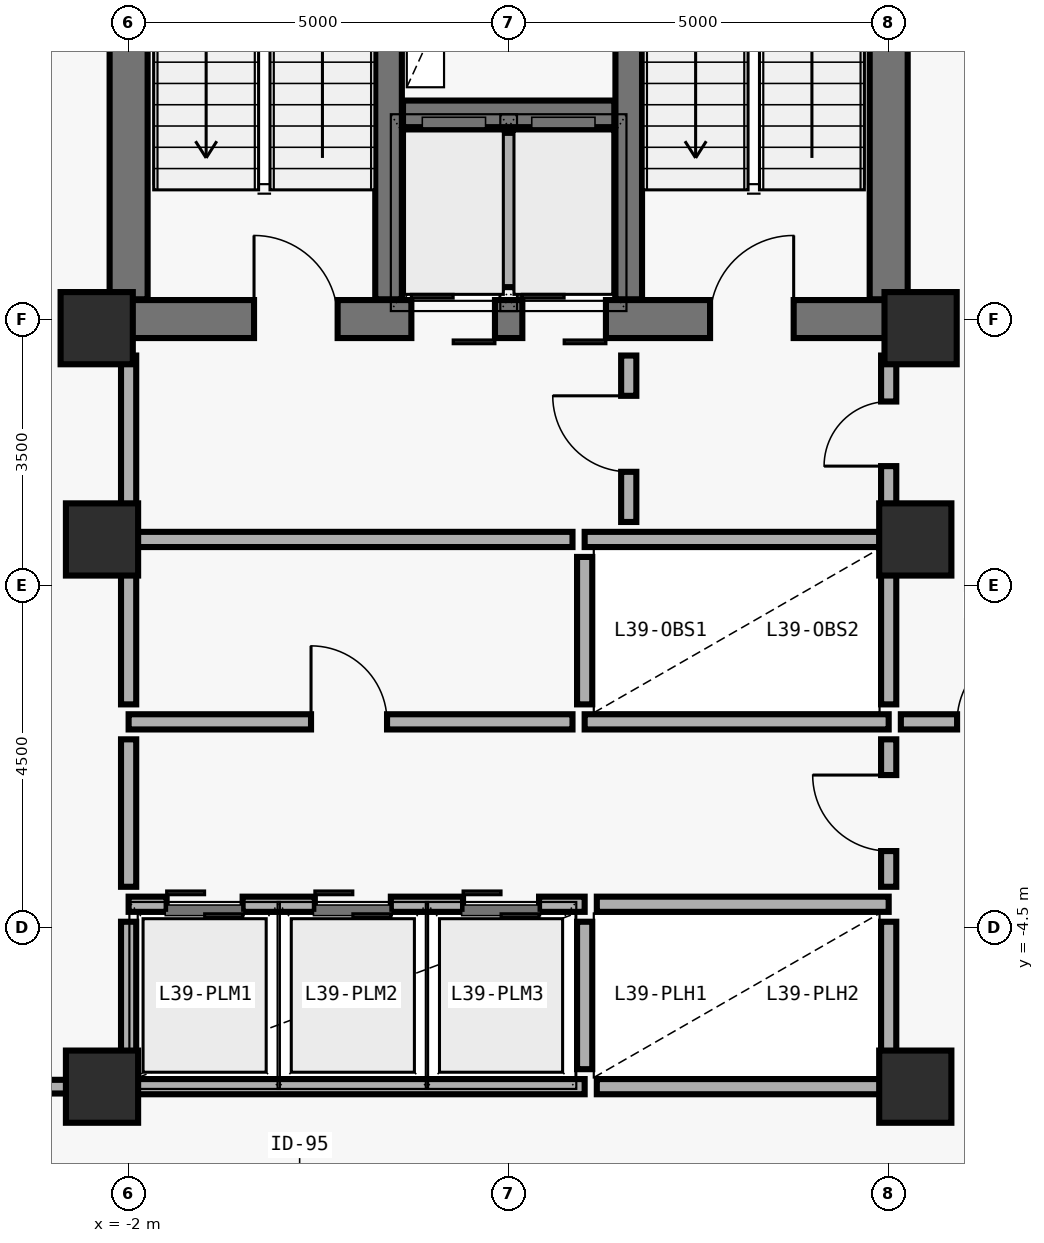
"""IFC4 building model, lengths in metres.
Left out: names, types, materials, properties, quantities, classifications, styles, units other than length and angle.
Written with IfcOpenShell. Run it as: python <this file> out.ifc"""

import sys

from ifc_helpers import new_model, si_unit, direction, frame, frame_2d, origin, origin_2d, place, context, subcontext, project, spatial, rectangle, extrude, element, fill, save


model = new_model("IFC4")
c1 = context("Model", 3, precision=1e-05, world=origin(), true_north=direction((0.0, 1.0)))
c2 = subcontext(c1, "Body", "Model", "MODEL_VIEW")
j1 = project(units=[si_unit("LENGTHUNIT", "METRE"), si_unit("PLANEANGLEUNIT", "RADIAN")], contexts=[c1])
p1 = place(None, origin())
s1 = spatial("IfcSite", under=j1, at=p1, CompositionType="ELEMENT")
p2 = place(p1, origin())
s2 = spatial("IfcBuilding", under=s1, at=p2, CompositionType="ELEMENT")
p3 = place(p2, frame((0.0, 0.0, 157.8)))
s3 = spatial("IfcBuildingStorey", under=s2, at=p3, CompositionType="ELEMENT", Elevation=157.8)
p4 = place(p3, frame((-2.0, 3.5, 0.0), z_axis=(0.0, 0.0, 1.0), x_axis=(1.0, 0.0, 0.0)))
e1 = element("IfcWall", 1, at=p4, inside=s3, PredefinedType="SHEAR", context=c2, shape_type="SweptSolid", body=[
    extrude(rectangle(XDim=10.0, YDim=0.5, at=frame_2d((5.0, 0.0))), origin(), (0.0, 0.0, 1.0), 3.892),
])
p5 = place(p4, frame((1.65, 0.0, 0.0)))
e2 = element("IfcOpeningElement", 2, at=p5, cuts=e1, PredefinedType="OPENING", context=c2, shape_type="SweptSolid", body=[
    extrude(rectangle(XDim=1.1, YDim=2.15, at=frame_2d((0.55, 1.075))), frame((0.0, 0.26, 0.0), z_axis=(0.0, -1.0, 0.0), x_axis=(1.0, 0.0, 0.0)), (0.0, 0.0, 1.0), 0.52),
])
p6 = place(p4, frame((7.65, 0.0, 0.0)))
e3 = element("IfcOpeningElement", 3, at=p6, cuts=e1, PredefinedType="OPENING", context=c2, shape_type="SweptSolid", body=[
    extrude(rectangle(XDim=1.1, YDim=2.15, at=frame_2d((0.55, 1.075))), frame((0.0, 0.26, 0.0), z_axis=(0.0, -1.0, 0.0), x_axis=(1.0, 0.0, 0.0)), (0.0, 0.0, 1.0), 0.52),
])
p7 = place(p4, frame((3.72, 0.0, 0.0)))
e4 = element("IfcOpeningElement", 4, at=p7, cuts=e1, PredefinedType="OPENING", context=c2, shape_type="SweptSolid", body=[
    extrude(rectangle(XDim=1.1, YDim=2.2, at=frame_2d((0.55, 1.1))), frame((0.0, 0.26, 0.0), z_axis=(0.0, -1.0, 0.0), x_axis=(1.0, 0.0, 0.0)), (0.0, 0.0, 1.0), 0.52),
])
p8 = place(p4, frame((5.18, 0.0, 0.0)))
e5 = element("IfcOpeningElement", 5, at=p8, cuts=e1, PredefinedType="OPENING", context=c2, shape_type="SweptSolid", body=[
    extrude(rectangle(XDim=1.1, YDim=2.2, at=frame_2d((0.55, 1.1))), frame((0.0, 0.26, 0.0), z_axis=(0.0, -1.0, 0.0), x_axis=(1.0, 0.0, 0.0)), (0.0, 0.0, 1.0), 0.52),
])
for number, where, z_axis, x_axis in (
    (6, (-2.0, 3.76, 0.0), (0.0, 0.0, 1.0), (0.0, 1.0, 0.0)),
    (7, (8.0, 3.76, 0.0), (0.0, 0.0, 1.0), (0.0, 1.0, 0.0)),
):
    element("IfcWall", number, at=place(p3, frame(where, z_axis=z_axis, x_axis=x_axis)), inside=s3, PredefinedType="SHEAR", context=c2, shape_type="SweptSolid", body=[
        extrude(rectangle(XDim=8.48, YDim=0.5, at=frame_2d((4.24, 0.0))), origin(), (0.0, 0.0, 1.0), 3.892),
    ])
for number, where, z_axis, x_axis in (
    (8, (1.42, 3.76, 0.0), (0.0, 0.0, 1.0), (0.0, 1.0, 0.0)),
    (9, (4.58, 3.76, 0.0), (0.0, 0.0, 1.0), (0.0, 1.0, 0.0)),
):
    element("IfcWall", number, at=place(p3, frame(where, z_axis=z_axis, x_axis=x_axis)), inside=s3, PredefinedType="SHEAR", context=c2, shape_type="SweptSolid", body=[
        extrude(rectangle(XDim=8.48, YDim=0.35, at=frame_2d((4.24, 0.0))), origin(), (0.0, 0.0, 1.0), 3.892),
    ])
p9 = place(p3, frame((1.61, 6.2, 0.0), z_axis=(0.0, 0.0, 1.0), x_axis=(1.0, 0.0, 0.0)))
e10 = element("IfcWall", 10, at=p9, inside=s3, PredefinedType="SHEAR", context=c2, shape_type="SweptSolid", body=[
    extrude(rectangle(XDim=2.78, YDim=0.35, at=frame_2d((1.39, 0.0))), origin(), (0.0, 0.0, 1.0), 3.892),
])
for number, where, z_axis, x_axis in (
    (11, (-2.42, 3.38, 0.0), (0.0, 0.0, 1.0), (1.0, 0.0, 0.0)),
    (12, (8.42, 3.38, 0.0), (0.0, 0.0, 1.0), (1.0, 0.0, 0.0)),
    (13, (-2.35, 0.6, 0.0), (0.0, 0.0, 1.0), (1.0, 0.0, 0.0)),
    (14, (8.35, 0.6, 0.0), (0.0, 0.0, 1.0), (1.0, 0.0, 0.0)),
    (15, (-2.35, -6.6, 0.0), (0.0, 0.0, 1.0), (1.0, 0.0, 0.0)),
    (16, (8.35, -6.6, 0.0), (0.0, 0.0, 1.0), (1.0, 0.0, 0.0)),
):
    element("IfcColumn", number, at=place(p3, frame(where, z_axis=z_axis, x_axis=x_axis)), inside=s3, PredefinedType="COLUMN", context=c2, shape_type="SweptSolid", body=[
        extrude(rectangle(XDim=0.95, YDim=0.95, at=origin_2d()), origin(), (0.0, 0.0, 1.0), 3.875),
    ])
p10 = place(p3, frame((3.0, 3.92, 0.0), z_axis=(0.0, 0.0, 1.0), x_axis=(0.0, 1.0, 0.0)))
e17 = element("IfcWall", 17, at=p10, inside=s3, PredefinedType="SOLIDWALL", context=c2, shape_type="SweptSolid", body=[
    extrude(rectangle(XDim=2.03, YDim=0.2, at=frame_2d((1.015, 0.0))), origin(), (0.0, 0.0, 1.0), 3.64),
])
p11 = place(p3, frame((4.0, 0.6, 0.0), z_axis=(0.0, 0.0, 1.0), x_axis=(1.0, 0.0, 0.0)))
e18 = element("IfcWall", 18, at=p11, inside=s3, PredefinedType="SOLIDWALL", context=c2, shape_type="SweptSolid", body=[
    extrude(rectangle(XDim=3.88, YDim=0.2, at=frame_2d((1.94, 0.0))), origin(), (0.0, 0.0, 1.0), 3.222),
])
p12 = place(p3, frame((4.0, -1.8, 0.0), z_axis=(0.0, 0.0, 1.0), x_axis=(1.0, 0.0, 0.0)))
e19 = element("IfcWall", 19, at=p12, inside=s3, PredefinedType="SOLIDWALL", context=c2, shape_type="SweptSolid", body=[
    extrude(rectangle(XDim=4.0, YDim=0.2, at=frame_2d((2.0, 0.0))), origin(), (0.0, 0.0, 1.0), 3.64),
])
p13 = place(p3, frame((4.0, -1.57, 0.0), z_axis=(0.0, 0.0, 1.0), x_axis=(0.0, 1.0, 0.0)))
e20 = element("IfcWall", 20, at=p13, inside=s3, PredefinedType="SOLIDWALL", context=c2, shape_type="SweptSolid", body=[
    extrude(rectangle(XDim=1.94, YDim=0.2, at=frame_2d((0.97, 0.0))), origin(), (0.0, 0.0, 1.0), 3.64),
])
p14 = place(p3, frame((8.0, -1.57, 0.0), z_axis=(0.0, 0.0, 1.0), x_axis=(0.0, 1.0, 0.0)))
e21 = element("IfcWall", 21, at=p14, inside=s3, PredefinedType="SOLIDWALL", context=c2, shape_type="SweptSolid", body=[
    extrude(rectangle(XDim=2.05, YDim=0.2, at=frame_2d((1.025, 0.0))), origin(), (0.0, 0.0, 1.0), 3.072),
])
p15 = place(p3, frame((-2.0, -4.2, 0.0), z_axis=(0.0, 0.0, 1.0), x_axis=(1.0, 0.0, 0.0)))
e22 = element("IfcWall", 22, at=p15, inside=s3, PredefinedType="SOLIDWALL", context=c2, shape_type="SweptSolid", body=[
    extrude(rectangle(XDim=6.0, YDim=0.2, at=frame_2d((3.0, 0.0))), origin(), (0.0, 0.0, 1.0), 3.64),
])
p16 = place(p15, frame((0.5, 0.0, 0.0)))
e23 = element("IfcOpeningElement", 23, at=p16, cuts=e22, PredefinedType="OPENING", context=c2, shape_type="SweptSolid", body=[
    extrude(rectangle(XDim=1.0, YDim=2.2, at=frame_2d((0.5, 1.1))), frame((0.0, 0.11, 0.0), z_axis=(0.0, -1.0, 0.0), x_axis=(1.0, 0.0, 0.0)), (0.0, 0.0, 1.0), 0.22),
])
p17 = place(p15, frame((2.45, 0.0, 0.0)))
e24 = element("IfcOpeningElement", 24, at=p17, cuts=e22, PredefinedType="OPENING", context=c2, shape_type="SweptSolid", body=[
    extrude(rectangle(XDim=1.0, YDim=2.2, at=frame_2d((0.5, 1.1))), frame((0.0, 0.11, 0.0), z_axis=(0.0, -1.0, 0.0), x_axis=(1.0, 0.0, 0.0)), (0.0, 0.0, 1.0), 0.22),
])
p18 = place(p15, frame((4.4, 0.0, 0.0)))
e25 = element("IfcOpeningElement", 25, at=p18, cuts=e22, PredefinedType="OPENING", context=c2, shape_type="SweptSolid", body=[
    extrude(rectangle(XDim=1.0, YDim=2.2, at=frame_2d((0.5, 1.1))), frame((0.0, 0.11, 0.0), z_axis=(0.0, -1.0, 0.0), x_axis=(1.0, 0.0, 0.0)), (0.0, 0.0, 1.0), 0.22),
])
p19 = place(p3, frame((-2.0, -6.6, 0.0), z_axis=(0.0, 0.0, 1.0), x_axis=(1.0, 0.0, 0.0)))
e26 = element("IfcWall", 26, at=p19, inside=s3, PredefinedType="SOLIDWALL", context=c2, shape_type="SweptSolid", body=[
    extrude(rectangle(XDim=6.0, YDim=0.2, at=frame_2d((3.0, 0.0))), origin(), (0.0, 0.0, 1.0), 3.222),
])
p20 = place(p3, frame((-2.0, -6.37, 0.0), z_axis=(0.0, 0.0, 1.0), x_axis=(0.0, 1.0, 0.0)))
e27 = element("IfcWall", 27, at=p20, inside=s3, PredefinedType="SOLIDWALL", context=c2, shape_type="SweptSolid", body=[
    extrude(rectangle(XDim=1.94, YDim=0.2, at=frame_2d((0.97, 0.0))), origin(), (0.0, 0.0, 1.0), 3.022),
])
p21 = place(p3, frame((4.16, -4.2, 0.0), z_axis=(0.0, 0.0, 1.0), x_axis=(1.0, 0.0, 0.0)))
e28 = element("IfcWall", 28, at=p21, inside=s3, PredefinedType="SOLIDWALL", context=c2, shape_type="SweptSolid", body=[
    extrude(rectangle(XDim=3.84, YDim=0.2, at=frame_2d((1.92, 0.0))), origin(), (0.0, 0.0, 1.0), 3.64),
])
p22 = place(p3, frame((4.16, -6.6, 0.0), z_axis=(0.0, 0.0, 1.0), x_axis=(1.0, 0.0, 0.0)))
e29 = element("IfcWall", 29, at=p22, inside=s3, PredefinedType="SOLIDWALL", context=c2, shape_type="SweptSolid", body=[
    extrude(rectangle(XDim=3.84, YDim=0.2, at=frame_2d((1.92, 0.0))), origin(), (0.0, 0.0, 1.0), 3.222),
])
p23 = place(p3, frame((4.0, -6.37, 0.0), z_axis=(0.0, 0.0, 1.0), x_axis=(0.0, 1.0, 0.0)))
e30 = element("IfcWall", 30, at=p23, inside=s3, PredefinedType="SOLIDWALL", context=c2, shape_type="SweptSolid", body=[
    extrude(rectangle(XDim=1.94, YDim=0.2, at=frame_2d((0.97, 0.0))), origin(), (0.0, 0.0, 1.0), 3.64),
])
p24 = place(p3, frame((8.0, -6.37, 0.0), z_axis=(0.0, 0.0, 1.0), x_axis=(0.0, 1.0, 0.0)))
e31 = element("IfcWall", 31, at=p24, inside=s3, PredefinedType="SOLIDWALL", context=c2, shape_type="SweptSolid", body=[
    extrude(rectangle(XDim=1.94, YDim=0.2, at=frame_2d((0.97, 0.0))), origin(), (0.0, 0.0, 1.0), 3.072),
])
p25 = place(p3, frame((4.58, 0.83, 0.0), z_axis=(0.0, 0.0, 1.0), x_axis=(0.0, 1.0, 0.0)))
e32 = element("IfcWall", 32, at=p25, inside=s3, PredefinedType="MOVABLE", context=c2, shape_type="SweptSolid", body=[
    extrude(rectangle(XDim=2.19, YDim=0.2, at=frame_2d((1.095, 0.0))), origin(), (0.0, 0.0, 1.0), 3.64),
])
p26 = place(p25, frame((0.66, 0.0, 0.0)))
e33 = element("IfcOpeningElement", 33, at=p26, cuts=e32, PredefinedType="OPENING", context=c2, shape_type="SweptSolid", body=[
    extrude(rectangle(XDim=1.0, YDim=2.1, at=frame_2d((0.5, 1.05))), frame((0.0, 0.11, 0.0), z_axis=(0.0, -1.0, 0.0), x_axis=(1.0, 0.0, 0.0)), (0.0, 0.0, 1.0), 0.22),
])
p27 = place(p3, frame((8.0, 0.72, 0.0), z_axis=(0.0, 0.0, 1.0), x_axis=(0.0, 1.0, 0.0)))
e34 = element("IfcWall", 34, at=p27, inside=s3, PredefinedType="MOVABLE", context=c2, shape_type="SweptSolid", body=[
    extrude(rectangle(XDim=2.3, YDim=0.2, at=frame_2d((1.15, 0.0))), origin(), (0.0, 0.0, 1.0), 2.872),
])
p28 = place(p27, frame((0.845, 0.0, 0.0)))
e35 = element("IfcOpeningElement", 35, at=p28, cuts=e34, PredefinedType="OPENING", context=c2, shape_type="SweptSolid", body=[
    extrude(rectangle(XDim=0.85, YDim=2.1, at=frame_2d((0.425, 1.05))), frame((0.0, 0.11, 0.0), z_axis=(0.0, -1.0, 0.0), x_axis=(1.0, 0.0, 0.0)), (0.0, 0.0, 1.0), 0.22),
])
p29 = place(p3, frame((8.0, -3.97, 0.0), z_axis=(0.0, 0.0, 1.0), x_axis=(0.0, 1.0, 0.0)))
e36 = element("IfcWall", 36, at=p29, inside=s3, PredefinedType="MOVABLE", context=c2, shape_type="SweptSolid", body=[
    extrude(rectangle(XDim=1.94, YDim=0.2, at=frame_2d((0.97, 0.0))), origin(), (0.0, 0.0, 1.0), 3.072),
])
p30 = place(p29, frame((0.47, 0.0, 0.0)))
e37 = element("IfcOpeningElement", 37, at=p30, cuts=e36, PredefinedType="OPENING", context=c2, shape_type="SweptSolid", body=[
    extrude(rectangle(XDim=1.0, YDim=2.1, at=frame_2d((0.5, 1.05))), frame((0.0, 0.11, 0.0), z_axis=(0.0, -1.0, 0.0), x_axis=(1.0, 0.0, 0.0)), (0.0, 0.0, 1.0), 0.22),
])
p31 = place(p3, frame((-2.0, -1.8, 0.0), z_axis=(0.0, 0.0, 1.0), x_axis=(1.0, 0.0, 0.0)))
e38 = element("IfcWall", 38, at=p31, inside=s3, PredefinedType="MOVABLE", context=c2, shape_type="SweptSolid", body=[
    extrude(rectangle(XDim=5.84, YDim=0.2, at=frame_2d((2.92, 0.0))), origin(), (0.0, 0.0, 1.0), 3.64),
])
p32 = place(p31, frame((2.4, 0.0, 0.0)))
e39 = element("IfcOpeningElement", 39, at=p32, cuts=e38, PredefinedType="OPENING", context=c2, shape_type="SweptSolid", body=[
    extrude(rectangle(XDim=1.0, YDim=2.1, at=frame_2d((0.5, 1.05))), frame((0.0, 0.11, 0.0), z_axis=(0.0, -1.0, 0.0), x_axis=(1.0, 0.0, 0.0)), (0.0, 0.0, 1.0), 0.22),
])
p33 = place(p3, frame((8.16, -1.8, 0.0), z_axis=(0.0, 0.0, 1.0), x_axis=(1.0, 0.0, 0.0)))
e40 = element("IfcWall", 40, at=p33, inside=s3, PredefinedType="MOVABLE", context=c2, shape_type="SweptSolid", body=[
    extrude(rectangle(XDim=2.64, YDim=0.2, at=frame_2d((1.32, 0.0))), origin(), (0.0, 0.0, 1.0), 3.64),
])
p34 = place(p33, frame((0.74, 0.0, 0.0)))
e41 = element("IfcOpeningElement", 41, at=p34, cuts=e40, PredefinedType="OPENING", context=c2, shape_type="SweptSolid", body=[
    extrude(rectangle(XDim=1.0, YDim=2.1, at=frame_2d((0.5, 1.05))), frame((0.0, 0.11, 0.0), z_axis=(0.0, -1.0, 0.0), x_axis=(1.0, 0.0, 0.0)), (0.0, 0.0, 1.0), 0.22),
])
p35 = place(p3, frame((-2.16, -6.6, 0.0), z_axis=(0.0, 0.0, 1.0), x_axis=(-1.0, 0.0, 0.0)))
e42 = element("IfcWall", 42, at=p35, inside=s3, PredefinedType="PLUMBINGWALL", context=c2, shape_type="SweptSolid", body=[
    extrude(rectangle(XDim=10.34, YDim=0.18, at=frame_2d((5.17, 0.0))), origin(), (0.0, 0.0, 1.0), 3.072),
])
p36 = place(p35, frame((4.615, 0.0, 0.0)))
e43 = element("IfcOpeningElement", 43, at=p36, cuts=e42, PredefinedType="OPENING", context=c2, shape_type="SweptSolid", body=[
    extrude(rectangle(XDim=0.95, YDim=2.1, at=frame_2d((0.475, 1.05))), frame((0.0, 0.1, 0.0), z_axis=(0.0, -1.0, 0.0), x_axis=(1.0, 0.0, 0.0)), (0.0, 0.0, 1.0), 0.2),
])
p37 = place(p3, frame((-1.88, 0.6, 0.0), z_axis=(0.0, 0.0, 1.0), x_axis=(1.0, 0.0, 0.0)))
e44 = element("IfcWall", 44, at=p37, inside=s3, PredefinedType="MOVABLE", context=c2, shape_type="SweptSolid", body=[
    extrude(rectangle(XDim=5.72, YDim=0.2, at=frame_2d((2.86, 0.0))), origin(), (0.0, 0.0, 1.0), 3.222),
])
p38 = place(p3, frame((-2.0, 0.72, 0.0), z_axis=(0.0, 0.0, 1.0), x_axis=(0.0, 1.0, 0.0)))
e45 = element("IfcWall", 45, at=p38, inside=s3, PredefinedType="MOVABLE", context=c2, shape_type="SweptSolid", body=[
    extrude(rectangle(XDim=2.3, YDim=0.2, at=frame_2d((1.15, 0.0))), origin(), (0.0, 0.0, 1.0), 2.872),
])
p39 = place(p3, frame((-2.0, -3.97, 0.0), z_axis=(0.0, 0.0, 1.0), x_axis=(0.0, 1.0, 0.0)))
e46 = element("IfcWall", 46, at=p39, inside=s3, PredefinedType="MOVABLE", context=c2, shape_type="SweptSolid", body=[
    extrude(rectangle(XDim=1.94, YDim=0.2, at=frame_2d((0.97, 0.0))), origin(), (0.0, 0.0, 1.0), 3.022),
])
p40 = place(p3, frame((-2.0, -1.57, 0.0), z_axis=(0.0, 0.0, 1.0), x_axis=(0.0, 1.0, 0.0)))
e47 = element("IfcWall", 47, at=p40, inside=s3, PredefinedType="MOVABLE", context=c2, shape_type="SweptSolid", body=[
    extrude(rectangle(XDim=2.05, YDim=0.2, at=frame_2d((1.025, 0.0))), origin(), (0.0, 0.0, 1.0), 3.022),
])
p41 = place(p5, origin())
e48 = element("IfcDoor", 48, at=p41, inside=s3, OperationType="SINGLE_SWING_LEFT", PredefinedType="DOOR", context=c2, shape_type="SweptSolid", body=[
    extrude(rectangle(XDim=1.1, YDim=2.15, at=frame_2d((0.55, 1.075))), frame((0.0, 0.025, 0.0), z_axis=(0.0, -1.0, 0.0), x_axis=(1.0, 0.0, 0.0)), (0.0, 0.0, 1.0), 0.05),
])
fill(e2, e48)
p42 = place(p6, origin())
e49 = element("IfcDoor", 49, at=p42, inside=s3, OperationType="SINGLE_SWING_RIGHT", PredefinedType="DOOR", context=c2, shape_type="SweptSolid", body=[
    extrude(rectangle(XDim=1.1, YDim=2.15, at=frame_2d((0.55, 1.075))), frame((0.0, 0.025, 0.0), z_axis=(0.0, -1.0, 0.0), x_axis=(1.0, 0.0, 0.0)), (0.0, 0.0, 1.0), 0.05),
])
fill(e3, e49)
p43 = place(p7, origin())
e50 = element("IfcDoor", 50, at=p43, inside=s3, OperationType="DOUBLE_DOOR_SLIDING", PredefinedType="DOOR", context=c2, shape_type="SweptSolid", body=[
    extrude(rectangle(XDim=1.1, YDim=2.2, at=frame_2d((0.55, 1.1))), frame((0.0, 0.025, 0.0), z_axis=(0.0, -1.0, 0.0), x_axis=(1.0, 0.0, 0.0)), (0.0, 0.0, 1.0), 0.05),
])
fill(e4, e50)
p44 = place(p8, origin())
e51 = element("IfcDoor", 51, at=p44, inside=s3, OperationType="DOUBLE_DOOR_SLIDING", PredefinedType="DOOR", context=c2, shape_type="SweptSolid", body=[
    extrude(rectangle(XDim=1.1, YDim=2.2, at=frame_2d((0.55, 1.1))), frame((0.0, 0.025, 0.0), z_axis=(0.0, -1.0, 0.0), x_axis=(1.0, 0.0, 0.0)), (0.0, 0.0, 1.0), 0.05),
])
fill(e5, e51)
p45 = place(p26, origin())
e52 = element("IfcDoor", 52, at=p45, inside=s3, OperationType="SINGLE_SWING_RIGHT", PredefinedType="DOOR", context=c2, shape_type="SweptSolid", body=[
    extrude(rectangle(XDim=1.0, YDim=2.1, at=frame_2d((0.5, 1.05))), frame((0.0, 0.025, 0.0), z_axis=(0.0, -1.0, 0.0), x_axis=(1.0, 0.0, 0.0)), (0.0, 0.0, 1.0), 0.05),
])
fill(e33, e52)
p46 = place(p28, origin())
e53 = element("IfcDoor", 53, at=p46, inside=s3, OperationType="SINGLE_SWING_LEFT", PredefinedType="DOOR", context=c2, shape_type="SweptSolid", body=[
    extrude(rectangle(XDim=0.85, YDim=2.1, at=frame_2d((0.425, 1.05))), frame((0.0, 0.025, 0.0), z_axis=(0.0, -1.0, 0.0), x_axis=(1.0, 0.0, 0.0)), (0.0, 0.0, 1.0), 0.05),
])
fill(e35, e53)
p47 = place(p30, origin())
e54 = element("IfcDoor", 54, at=p47, inside=s3, OperationType="SINGLE_SWING_RIGHT", PredefinedType="DOOR", context=c2, shape_type="SweptSolid", body=[
    extrude(rectangle(XDim=1.0, YDim=2.1, at=frame_2d((0.5, 1.05))), frame((0.0, 0.025, 0.0), z_axis=(0.0, -1.0, 0.0), x_axis=(1.0, 0.0, 0.0)), (0.0, 0.0, 1.0), 0.05),
])
fill(e37, e54)
p48 = place(p32, origin())
e55 = element("IfcDoor", 55, at=p48, inside=s3, OperationType="SINGLE_SWING_LEFT", PredefinedType="DOOR", context=c2, shape_type="SweptSolid", body=[
    extrude(rectangle(XDim=1.0, YDim=2.1, at=frame_2d((0.5, 1.05))), frame((0.0, 0.025, 0.0), z_axis=(0.0, -1.0, 0.0), x_axis=(1.0, 0.0, 0.0)), (0.0, 0.0, 1.0), 0.05),
])
fill(e39, e55)
p49 = place(p34, origin())
e56 = element("IfcDoor", 56, at=p49, inside=s3, OperationType="SINGLE_SWING_RIGHT", PredefinedType="DOOR", context=c2, shape_type="SweptSolid", body=[
    extrude(rectangle(XDim=1.0, YDim=2.1, at=frame_2d((0.5, 1.05))), frame((0.0, 0.025, 0.0), z_axis=(0.0, -1.0, 0.0), x_axis=(1.0, 0.0, 0.0)), (0.0, 0.0, 1.0), 0.05),
])
fill(e41, e56)
p50 = place(p16, origin())
e57 = element("IfcDoor", 57, at=p50, inside=s3, OperationType="DOUBLE_DOOR_SLIDING", PredefinedType="DOOR", context=c2, shape_type="SweptSolid", body=[
    extrude(rectangle(XDim=1.0, YDim=2.2, at=frame_2d((0.5, 1.1))), frame((0.0, 0.025, 0.0), z_axis=(0.0, -1.0, 0.0), x_axis=(1.0, 0.0, 0.0)), (0.0, 0.0, 1.0), 0.05),
])
fill(e23, e57)
p51 = place(p17, origin())
e58 = element("IfcDoor", 58, at=p51, inside=s3, OperationType="DOUBLE_DOOR_SLIDING", PredefinedType="DOOR", context=c2, shape_type="SweptSolid", body=[
    extrude(rectangle(XDim=1.0, YDim=2.2, at=frame_2d((0.5, 1.1))), frame((0.0, 0.025, 0.0), z_axis=(0.0, -1.0, 0.0), x_axis=(1.0, 0.0, 0.0)), (0.0, 0.0, 1.0), 0.05),
])
fill(e24, e58)
p52 = place(p18, origin())
e59 = element("IfcDoor", 59, at=p52, inside=s3, OperationType="DOUBLE_DOOR_SLIDING", PredefinedType="DOOR", context=c2, shape_type="SweptSolid", body=[
    extrude(rectangle(XDim=1.0, YDim=2.2, at=frame_2d((0.5, 1.1))), frame((0.0, 0.025, 0.0), z_axis=(0.0, -1.0, 0.0), x_axis=(1.0, 0.0, 0.0)), (0.0, 0.0, 1.0), 0.05),
])
fill(e25, e59)
save(model, sys.argv[1])
